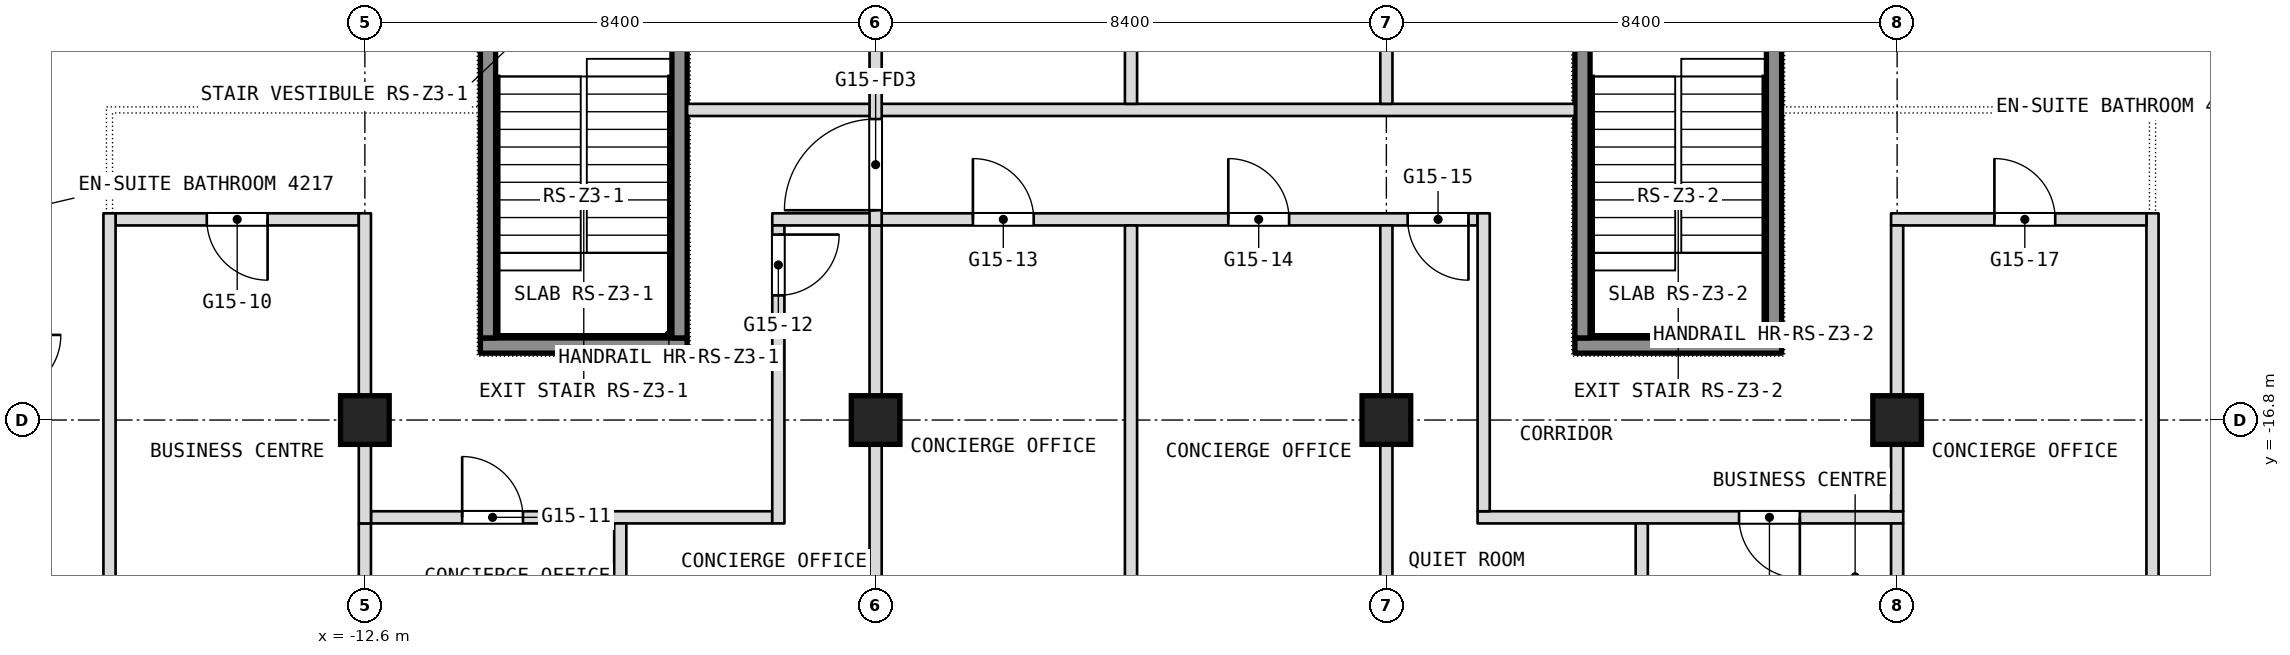
"""IFC4 building model, lengths in metres.
Left out: names, types, materials, properties, quantities, classifications, styles, units other than length and angle.
Written with IfcOpenShell. Run it as: python <this file> out.ifc"""

import sys

from ifc_helpers import new_model, si_unit, direction, frame, frame_2d, origin, origin_2d, place, context, subcontext, project, spatial, rectangle, extrude, element, fill, save


model = new_model("IFC4")
c1 = context("Model", 3, precision=1e-05, world=origin(), true_north=direction((0.0, 1.0)))
c2 = subcontext(c1, "Body", "Model", "MODEL_VIEW")
j1 = project(units=[si_unit("LENGTHUNIT", "METRE"), si_unit("PLANEANGLEUNIT", "RADIAN")], contexts=[c1])
p1 = place(None, origin())
s1 = spatial("IfcSite", under=j1, at=p1, CompositionType="ELEMENT")
p2 = place(p1, origin())
s2 = spatial("IfcBuilding", under=s1, at=p2, CompositionType="ELEMENT")
p3 = place(p2, frame((0.0, 0.0, 187.7)))
s3 = spatial("IfcBuildingStorey", under=s2, at=p3, CompositionType="ELEMENT", Elevation=187.7)
for number, where, z_axis, x_axis in (
    (1, (-12.6, -16.8, 0.0), (0.0, 0.0, 1.0), (1.0, 0.0, 0.0)),
    (2, (-4.2, -16.8, 0.0), (0.0, 0.0, 1.0), (1.0, 0.0, 0.0)),
    (3, (4.2, -16.8, 0.0), (0.0, 0.0, 1.0), (1.0, 0.0, 0.0)),
    (4, (12.6, -16.8, 0.0), (0.0, 0.0, 1.0), (1.0, 0.0, 0.0)),
):
    element("IfcColumn", number, at=place(p3, frame(where, z_axis=z_axis, x_axis=x_axis)), inside=s3, PredefinedType="COLUMN", context=c2, shape_type="SweptSolid", body=[
        extrude(rectangle(XDim=0.8, YDim=0.8, at=origin_2d()), origin(), (0.0, 0.0, 1.0), 3.6),
    ])
p4 = place(p3, frame((-12.5, -18.4, 0.0), z_axis=(0.0, 0.0, 1.0), x_axis=(1.0, 0.0, 0.0)))
e5 = element("IfcWall", 5, at=p4, inside=s3, PredefinedType="PARTITIONING", context=c2, shape_type="SweptSolid", body=[
    extrude(rectangle(XDim=6.6, YDim=0.2, at=frame_2d((3.3, 0.0))), origin(), (0.0, 0.0, 1.0), 3.34),
])
p5 = place(p4, frame((1.5, 0.0, 0.0)))
e6 = element("IfcOpeningElement", 6, at=p5, cuts=e5, PredefinedType="OPENING", context=c2, shape_type="SweptSolid", body=[
    extrude(rectangle(XDim=1.0, YDim=2.1, at=frame_2d((0.5, 1.05))), frame((0.0, 0.1, 0.0), z_axis=(0.0, -1.0, 0.0), x_axis=(1.0, 0.0, 0.0)), (0.0, 0.0, 1.0), 0.2),
])
p6 = place(p3, frame((5.7, -18.4, 0.0), z_axis=(0.0, 0.0, 1.0), x_axis=(1.0, 0.0, 0.0)))
e7 = element("IfcWall", 7, at=p6, inside=s3, PredefinedType="PARTITIONING", context=c2, shape_type="SweptSolid", body=[
    extrude(rectangle(XDim=7.0, YDim=0.2, at=frame_2d((3.5, 0.0))), origin(), (0.0, 0.0, 1.0), 3.34),
])
p7 = place(p6, frame((4.3, 0.0, 0.0)))
e8 = element("IfcOpeningElement", 8, at=p7, cuts=e7, PredefinedType="OPENING", context=c2, shape_type="SweptSolid", body=[
    extrude(rectangle(XDim=1.0, YDim=2.1, at=frame_2d((0.5, 1.05))), frame((0.0, 0.1, 0.0), z_axis=(0.0, -1.0, 0.0), x_axis=(1.0, 0.0, 0.0)), (0.0, 0.0, 1.0), 0.2),
])
p8 = place(p3, frame((16.8, -20.2, 0.0), z_axis=(0.0, 0.0, 1.0), x_axis=(0.0, 1.0, 0.0)))
e9 = element("IfcWall", 9, at=p8, inside=s3, PredefinedType="PARTITIONING", context=c2, shape_type="SweptSolid", body=[
    extrude(rectangle(XDim=6.8, YDim=0.2, at=frame_2d((3.4, 0.0))), origin(), (0.0, 0.0, 1.0), 3.34),
])
p9 = place(p3, frame((-16.7, -13.5, 0.0), z_axis=(0.0, 0.0, 1.0), x_axis=(1.0, 0.0, 0.0)))
e10 = element("IfcWall", 10, at=p9, inside=s3, PredefinedType="PARTITIONING", context=c2, shape_type="SweptSolid", body=[
    extrude(rectangle(XDim=4.0, YDim=0.2, at=frame_2d((2.0, 0.0))), origin(), (0.0, 0.0, 1.0), 3.34),
])
p10 = place(p9, frame((1.5, 0.0, 0.0)))
e11 = element("IfcOpeningElement", 11, at=p10, cuts=e10, PredefinedType="OPENING", context=c2, shape_type="SweptSolid", body=[
    extrude(rectangle(XDim=1.0, YDim=2.1, at=frame_2d((0.5, 1.05))), frame((0.0, 0.1, 0.0), z_axis=(0.0, -1.0, 0.0), x_axis=(1.0, 0.0, 0.0)), (0.0, 0.0, 1.0), 0.2),
])
p11 = place(p3, frame((-5.9, -13.5, 0.0), z_axis=(0.0, 0.0, 1.0), x_axis=(1.0, 0.0, 0.0)))
e12 = element("IfcWall", 12, at=p11, inside=s3, PredefinedType="PARTITIONING", context=c2, shape_type="SweptSolid", body=[
    extrude(rectangle(XDim=11.6, YDim=0.2, at=frame_2d((5.8, 0.0))), origin(), (0.0, 0.0, 1.0), 3.34),
])
p12 = place(p11, frame((3.3, 0.0, 0.0)))
e13 = element("IfcOpeningElement", 13, at=p12, cuts=e12, PredefinedType="OPENING", context=c2, shape_type="SweptSolid", body=[
    extrude(rectangle(XDim=1.0, YDim=2.1, at=frame_2d((0.5, 1.05))), frame((0.0, 0.1, 0.0), z_axis=(0.0, -1.0, 0.0), x_axis=(1.0, 0.0, 0.0)), (0.0, 0.0, 1.0), 0.2),
])
p13 = place(p11, frame((7.5, 0.0, 0.0)))
e14 = element("IfcOpeningElement", 14, at=p13, cuts=e12, PredefinedType="OPENING", context=c2, shape_type="SweptSolid", body=[
    extrude(rectangle(XDim=1.0, YDim=2.1, at=frame_2d((0.5, 1.05))), frame((0.0, 0.1, 0.0), z_axis=(0.0, -1.0, 0.0), x_axis=(1.0, 0.0, 0.0)), (0.0, 0.0, 1.0), 0.2),
])
p14 = place(p11, frame((10.45, 0.0, 0.0)))
e15 = element("IfcOpeningElement", 15, at=p14, cuts=e12, PredefinedType="OPENING", context=c2, shape_type="SweptSolid", body=[
    extrude(rectangle(XDim=1.0, YDim=2.1, at=frame_2d((0.5, 1.05))), frame((0.0, 0.1, 0.0), z_axis=(0.0, -1.0, 0.0), x_axis=(1.0, 0.0, 0.0)), (0.0, 0.0, 1.0), 0.2),
])
p15 = place(p3, frame((12.5, -13.5, 0.0), z_axis=(0.0, 0.0, 1.0), x_axis=(1.0, 0.0, 0.0)))
e16 = element("IfcWall", 16, at=p15, inside=s3, PredefinedType="PARTITIONING", context=c2, shape_type="SweptSolid", body=[
    extrude(rectangle(XDim=4.2, YDim=0.2, at=frame_2d((2.1, 0.0))), origin(), (0.0, 0.0, 1.0), 3.34),
])
p16 = place(p15, frame((1.7, 0.0, 0.0)))
e17 = element("IfcOpeningElement", 17, at=p16, cuts=e16, PredefinedType="OPENING", context=c2, shape_type="SweptSolid", body=[
    extrude(rectangle(XDim=1.0, YDim=2.1, at=frame_2d((0.5, 1.05))), frame((0.0, 0.1, 0.0), z_axis=(0.0, -1.0, 0.0), x_axis=(1.0, 0.0, 0.0)), (0.0, 0.0, 1.0), 0.2),
])
p17 = place(p3, frame((12.6, -20.0, 0.0), z_axis=(0.0, 0.0, 1.0), x_axis=(0.0, 1.0, 0.0)))
e18 = element("IfcWall", 18, at=p17, inside=s3, PredefinedType="PARTITIONING", context=c2, shape_type="SweptSolid", body=[
    extrude(rectangle(XDim=1.5, YDim=0.2, at=frame_2d((0.75, 0.0))), origin(), (0.0, 0.0, 1.0), 3.34),
])
p18 = place(p3, frame((12.6, -18.3, 0.0), z_axis=(0.0, 0.0, 1.0), x_axis=(0.0, 1.0, 0.0)))
e19 = element("IfcWall", 19, at=p18, inside=s3, PredefinedType="PARTITIONING", context=c2, shape_type="SweptSolid", body=[
    extrude(rectangle(XDim=4.7, YDim=0.2, at=frame_2d((2.35, 0.0))), origin(), (0.0, 0.0, 1.0), 3.34),
])
p19 = place(p3, frame((-7.3, -11.7, 0.0), z_axis=(0.0, 0.0, 1.0), x_axis=(1.0, 0.0, 0.0)))
e20 = element("IfcWall", 20, at=p19, inside=s3, PredefinedType="PARTITIONING", context=c2, shape_type="SweptSolid", body=[
    extrude(rectangle(XDim=14.6, YDim=0.2, at=frame_2d((7.3, 0.0))), origin(), (0.0, 0.0, 1.0), 3.34),
])
p20 = place(p3, frame((8.4, -20.0, 0.0), z_axis=(0.0, 0.0, 1.0), x_axis=(0.0, 1.0, 0.0)))
e21 = element("IfcWall", 21, at=p20, inside=s3, PredefinedType="PARTITIONING", context=c2, shape_type="SweptSolid", body=[
    extrude(rectangle(XDim=1.5, YDim=0.2, at=frame_2d((0.75, 0.0))), origin(), (0.0, 0.0, 1.0), 3.34),
])
p21 = place(p3, frame((5.8, -18.3, 0.0), z_axis=(0.0, 0.0, 1.0), x_axis=(0.0, 1.0, 0.0)))
e22 = element("IfcWall", 22, at=p21, inside=s3, PredefinedType="PARTITIONING", context=c2, shape_type="SweptSolid", body=[
    extrude(rectangle(XDim=4.9, YDim=0.2, at=frame_2d((2.45, 0.0))), origin(), (0.0, 0.0, 1.0), 3.34),
])
p22 = place(p3, frame((4.2, -20.0, 0.0), z_axis=(0.0, 0.0, 1.0), x_axis=(0.0, 1.0, 0.0)))
e23 = element("IfcWall", 23, at=p22, inside=s3, PredefinedType="PARTITIONING", context=c2, shape_type="SweptSolid", body=[
    extrude(rectangle(XDim=6.4, YDim=0.2, at=frame_2d((3.2, 0.0))), origin(), (0.0, 0.0, 1.0), 3.34),
])
p23 = place(p3, frame((4.2, -11.6, 0.0), z_axis=(0.0, 0.0, 1.0), x_axis=(0.0, 1.0, 0.0)))
e24 = element("IfcWall", 24, at=p23, inside=s3, PredefinedType="PARTITIONING", context=c2, shape_type="SweptSolid", body=[
    extrude(rectangle(XDim=9.7, YDim=0.2, at=frame_2d((4.85, 0.0))), origin(), (0.0, 0.0, 1.0), 3.34),
])
p24 = place(p3, frame((0.0, -20.0, 0.0), z_axis=(0.0, 0.0, 1.0), x_axis=(0.0, 1.0, 0.0)))
e25 = element("IfcWall", 25, at=p24, inside=s3, PredefinedType="PARTITIONING", context=c2, shape_type="SweptSolid", body=[
    extrude(rectangle(XDim=6.4, YDim=0.2, at=frame_2d((3.2, 0.0))), origin(), (0.0, 0.0, 1.0), 3.34),
])
p25 = place(p3, frame((0.0, -11.6, 0.0), z_axis=(0.0, 0.0, 1.0), x_axis=(0.0, 1.0, 0.0)))
e26 = element("IfcWall", 26, at=p25, inside=s3, PredefinedType="PARTITIONING", context=c2, shape_type="SweptSolid", body=[
    extrude(rectangle(XDim=9.7, YDim=0.2, at=frame_2d((4.85, 0.0))), origin(), (0.0, 0.0, 1.0), 3.34),
])
p26 = place(p3, frame((-4.2, -22.0, 0.0), z_axis=(0.0, 0.0, 1.0), x_axis=(0.0, 1.0, 0.0)))
e27 = element("IfcWall", 27, at=p26, inside=s3, PredefinedType="PARTITIONING", context=c2, shape_type="SweptSolid", body=[
    extrude(rectangle(XDim=8.4, YDim=0.2, at=frame_2d((4.2, 0.0))), origin(), (0.0, 0.0, 1.0), 3.34),
])
p27 = place(p26, frame((0.25, 0.0, 0.0)))
e28 = element("IfcOpeningElement", 28, at=p27, cuts=e27, PredefinedType="OPENING", context=c2, shape_type="SweptSolid", body=[
    extrude(rectangle(XDim=1.5, YDim=2.1, at=frame_2d((0.75, 1.05))), frame((0.0, 0.1, 0.0), z_axis=(0.0, -1.0, 0.0), x_axis=(1.0, 0.0, 0.0)), (0.0, 0.0, 1.0), 0.2),
])
p28 = place(p3, frame((-4.2, -13.6, 0.0), z_axis=(0.0, 0.0, 1.0), x_axis=(0.0, 1.0, 0.0)))
e29 = element("IfcWall", 29, at=p28, inside=s3, PredefinedType="PARTITIONING", context=c2, shape_type="SweptSolid", body=[
    extrude(rectangle(XDim=13.6, YDim=0.2, at=frame_2d((6.8, 0.0))), origin(), (0.0, 0.0, 1.0), 3.34),
])
p29 = place(p28, frame((11.95, 0.0, 0.0)))
e30 = element("IfcOpeningElement", 30, at=p29, cuts=e29, PredefinedType="OPENING", context=c2, shape_type="SweptSolid", body=[
    extrude(rectangle(XDim=1.5, YDim=2.1, at=frame_2d((0.75, 1.05))), frame((0.0, 0.1, 0.0), z_axis=(0.0, -1.0, 0.0), x_axis=(1.0, 0.0, 0.0)), (0.0, 0.0, 1.0), 0.2),
])
p30 = place(p28, frame((0.25, 0.0, 0.0)))
e31 = element("IfcOpeningElement", 31, at=p30, cuts=e29, PredefinedType="OPENING", context=c2, shape_type="SweptSolid", body=[
    extrude(rectangle(XDim=1.5, YDim=2.1, at=frame_2d((0.75, 1.05))), frame((0.0, 0.1, 0.0), z_axis=(0.0, -1.0, 0.0), x_axis=(1.0, 0.0, 0.0)), (0.0, 0.0, 1.0), 0.2),
])
p31 = place(p3, frame((-5.8, -18.5, 0.0), z_axis=(0.0, 0.0, 1.0), x_axis=(0.0, 1.0, 0.0)))
e32 = element("IfcWall", 32, at=p31, inside=s3, PredefinedType="PARTITIONING", context=c2, shape_type="SweptSolid", body=[
    extrude(rectangle(XDim=4.9, YDim=0.2, at=frame_2d((2.45, 0.0))), origin(), (0.0, 0.0, 1.0), 3.34),
])
p32 = place(p31, frame((3.75, 0.0, 0.0)))
e33 = element("IfcOpeningElement", 33, at=p32, cuts=e32, PredefinedType="OPENING", context=c2, shape_type="SweptSolid", body=[
    extrude(rectangle(XDim=1.0, YDim=2.1, at=frame_2d((0.5, 1.05))), frame((0.0, 0.1, 0.0), z_axis=(0.0, -1.0, 0.0), x_axis=(1.0, 0.0, 0.0)), (0.0, 0.0, 1.0), 0.2),
])
for number, where, z_axis, x_axis in (
    (34, (-8.4, -20.0, 0.0), (0.0, 0.0, 1.0), (0.0, 1.0, 0.0)),
    (35, (-12.6, -20.0, 0.0), (0.0, 0.0, 1.0), (0.0, 1.0, 0.0)),
):
    element("IfcWall", number, at=place(p3, frame(where, z_axis=z_axis, x_axis=x_axis)), inside=s3, PredefinedType="PARTITIONING", context=c2, shape_type="SweptSolid", body=[
        extrude(rectangle(XDim=1.5, YDim=0.2, at=frame_2d((0.75, 0.0))), origin(), (0.0, 0.0, 1.0), 3.34),
    ])
p33 = place(p3, frame((-12.6, -18.5, 0.0), z_axis=(0.0, 0.0, 1.0), x_axis=(0.0, 1.0, 0.0)))
e36 = element("IfcWall", 36, at=p33, inside=s3, PredefinedType="PARTITIONING", context=c2, shape_type="SweptSolid", body=[
    extrude(rectangle(XDim=5.1, YDim=0.2, at=frame_2d((2.55, 0.0))), origin(), (0.0, 0.0, 1.0), 3.34),
])
p34 = place(p3, frame((-16.8, -20.2, 0.0), z_axis=(0.0, 0.0, 1.0), x_axis=(0.0, 1.0, 0.0)))
e37 = element("IfcWall", 37, at=p34, inside=s3, PredefinedType="PARTITIONING", context=c2, shape_type="SweptSolid", body=[
    extrude(rectangle(XDim=6.8, YDim=0.2, at=frame_2d((3.4, 0.0))), origin(), (0.0, 0.0, 1.0), 3.34),
])
p35 = place(p3, frame((-10.7, -15.575, 0.1), z_axis=(0.0, 0.0, 1.0), x_axis=(1.0, 0.0, 0.0)))
e38 = element("IfcWall", 38, at=p35, inside=s3, PredefinedType="SHEAR", context=c2, shape_type="SweptSolid", body=[
    extrude(rectangle(XDim=3.4, YDim=0.25, at=frame_2d((1.7, 0.0))), origin(), (0.0, 0.0, 1.0), 3.6),
])
for number, where, z_axis, x_axis in (
    (39, (-10.575, -15.45, 0.1), (0.0, 0.0, 1.0), (0.0, 1.0, 0.0)),
    (40, (-7.425, -15.45, 0.1), (0.0, 0.0, 1.0), (0.0, 1.0, 0.0)),
):
    element("IfcWall", number, at=place(p3, frame(where, z_axis=z_axis, x_axis=x_axis)), inside=s3, PredefinedType="SHEAR", context=c2, shape_type="SweptSolid", body=[
        extrude(rectangle(XDim=5.7, YDim=0.25, at=frame_2d((2.85, 0.0))), origin(), (0.0, 0.0, 1.0), 3.6),
    ])
p36 = place(p3, frame((7.3, -15.575, 0.1), z_axis=(0.0, 0.0, 1.0), x_axis=(1.0, 0.0, 0.0)))
e41 = element("IfcWall", 41, at=p36, inside=s3, PredefinedType="SHEAR", context=c2, shape_type="SweptSolid", body=[
    extrude(rectangle(XDim=3.4, YDim=0.25, at=frame_2d((1.7, 0.0))), origin(), (0.0, 0.0, 1.0), 3.6),
])
for number, where, z_axis, x_axis in (
    (42, (7.425, -15.45, 0.1), (0.0, 0.0, 1.0), (0.0, 1.0, 0.0)),
    (43, (10.575, -15.45, 0.1), (0.0, 0.0, 1.0), (0.0, 1.0, 0.0)),
):
    element("IfcWall", number, at=place(p3, frame(where, z_axis=z_axis, x_axis=x_axis)), inside=s3, PredefinedType="SHEAR", context=c2, shape_type="SweptSolid", body=[
        extrude(rectangle(XDim=5.7, YDim=0.25, at=frame_2d((2.85, 0.0))), origin(), (0.0, 0.0, 1.0), 3.6),
    ])
p37 = place(p5, origin())
e44 = element("IfcDoor", 44, at=p37, inside=s3, OperationType="SINGLE_SWING_RIGHT", PredefinedType="DOOR", context=c2, shape_type="SweptSolid", body=[
    extrude(rectangle(XDim=1.0, YDim=2.1, at=frame_2d((0.5, 1.05))), frame((0.0, 0.025, 0.0), z_axis=(0.0, -1.0, 0.0), x_axis=(1.0, 0.0, 0.0)), (0.0, 0.0, 1.0), 0.05),
])
fill(e6, e44)
p38 = place(p7, origin())
e45 = element("IfcDoor", 45, at=p38, inside=s3, OperationType="SINGLE_SWING_LEFT", PredefinedType="DOOR", context=c2, shape_type="SweptSolid", body=[
    extrude(rectangle(XDim=1.0, YDim=2.1, at=frame_2d((0.5, 1.05))), frame((0.0, 0.025, 0.0), z_axis=(0.0, -1.0, 0.0), x_axis=(1.0, 0.0, 0.0)), (0.0, 0.0, 1.0), 0.05),
])
fill(e8, e45)
p39 = place(p10, origin())
e46 = element("IfcDoor", 46, at=p39, inside=s3, OperationType="SINGLE_SWING_RIGHT", PredefinedType="DOOR", context=c2, shape_type="SweptSolid", body=[
    extrude(rectangle(XDim=1.0, YDim=2.1, at=frame_2d((0.5, 1.05))), frame((0.0, 0.025, 0.0), z_axis=(0.0, -1.0, 0.0), x_axis=(1.0, 0.0, 0.0)), (0.0, 0.0, 1.0), 0.05),
])
fill(e11, e46)
p40 = place(p12, origin())
e47 = element("IfcDoor", 47, at=p40, inside=s3, OperationType="SINGLE_SWING_LEFT", PredefinedType="DOOR", context=c2, shape_type="SweptSolid", body=[
    extrude(rectangle(XDim=1.0, YDim=2.1, at=frame_2d((0.5, 1.05))), frame((0.0, 0.025, 0.0), z_axis=(0.0, -1.0, 0.0), x_axis=(1.0, 0.0, 0.0)), (0.0, 0.0, 1.0), 0.05),
])
fill(e13, e47)
p41 = place(p13, origin())
e48 = element("IfcDoor", 48, at=p41, inside=s3, OperationType="SINGLE_SWING_RIGHT", PredefinedType="DOOR", context=c2, shape_type="SweptSolid", body=[
    extrude(rectangle(XDim=1.0, YDim=2.1, at=frame_2d((0.5, 1.05))), frame((0.0, 0.025, 0.0), z_axis=(0.0, -1.0, 0.0), x_axis=(1.0, 0.0, 0.0)), (0.0, 0.0, 1.0), 0.05),
])
fill(e14, e48)
p42 = place(p14, origin())
e49 = element("IfcDoor", 49, at=p42, inside=s3, OperationType="SINGLE_SWING_LEFT", PredefinedType="DOOR", context=c2, shape_type="SweptSolid", body=[
    extrude(rectangle(XDim=1.0, YDim=2.1, at=frame_2d((0.5, 1.05))), frame((0.0, 0.025, 0.0), z_axis=(0.0, -1.0, 0.0), x_axis=(1.0, 0.0, 0.0)), (0.0, 0.0, 1.0), 0.05),
])
fill(e15, e49)
p43 = place(p16, origin())
e50 = element("IfcDoor", 50, at=p43, inside=s3, OperationType="SINGLE_SWING_LEFT", PredefinedType="DOOR", context=c2, shape_type="SweptSolid", body=[
    extrude(rectangle(XDim=1.0, YDim=2.1, at=frame_2d((0.5, 1.05))), frame((0.0, 0.025, 0.0), z_axis=(0.0, -1.0, 0.0), x_axis=(1.0, 0.0, 0.0)), (0.0, 0.0, 1.0), 0.05),
])
fill(e17, e50)
p44 = place(p32, origin())
e51 = element("IfcDoor", 51, at=p44, inside=s3, OperationType="SINGLE_SWING_RIGHT", PredefinedType="DOOR", context=c2, shape_type="SweptSolid", body=[
    extrude(rectangle(XDim=1.0, YDim=2.1, at=frame_2d((0.5, 1.05))), frame((0.0, 0.025, 0.0), z_axis=(0.0, -1.0, 0.0), x_axis=(1.0, 0.0, 0.0)), (0.0, 0.0, 1.0), 0.05),
])
fill(e33, e51)
p45 = place(p30, origin())
e52 = element("IfcDoor", 52, at=p45, inside=s3, OperationType="DOUBLE_DOOR_DOUBLE_SWING", PredefinedType="DOOR", context=c2, shape_type="SweptSolid", body=[
    extrude(rectangle(XDim=1.5, YDim=2.1, at=frame_2d((0.75, 1.05))), frame((0.0, 0.025, 0.0), z_axis=(0.0, -1.0, 0.0), x_axis=(1.0, 0.0, 0.0)), (0.0, 0.0, 1.0), 0.05),
])
fill(e31, e52)
save(model, sys.argv[1])
